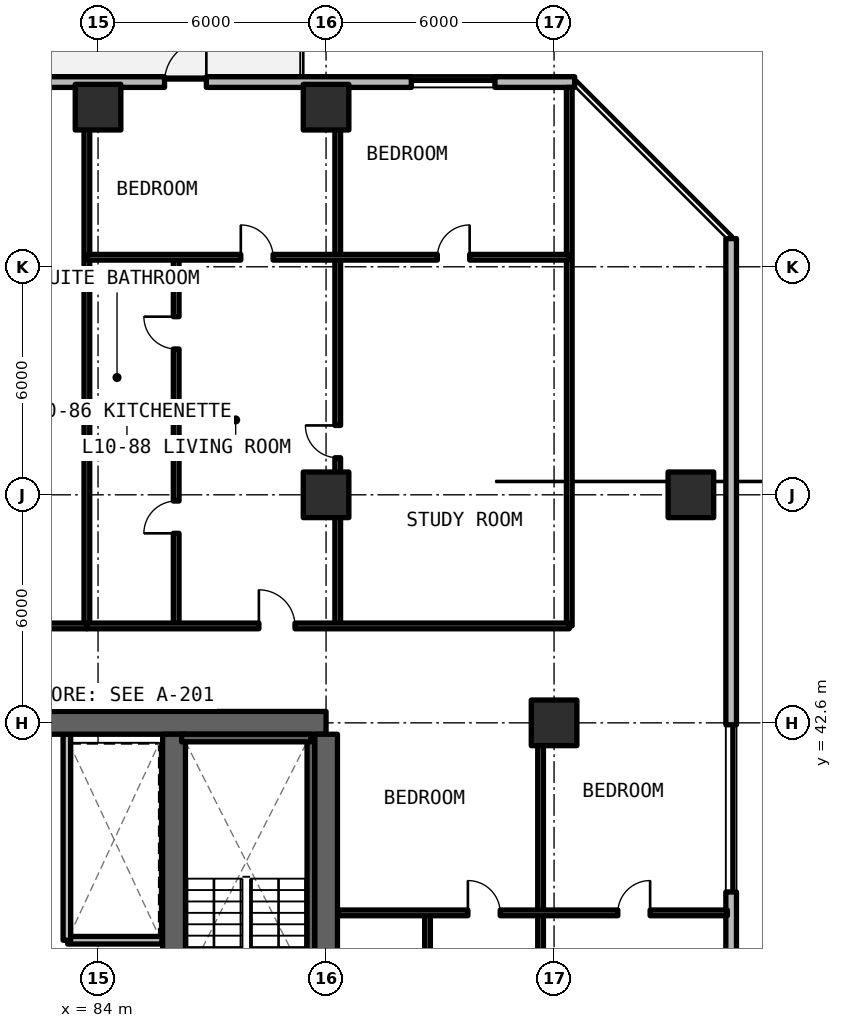
"""IFC4 building model, lengths in metres.
Left out: names, types, materials, properties, quantities, classifications, styles, units other than length and angle.
Written with IfcOpenShell. Run it as: python <this file> out.ifc"""

import sys

from ifc_helpers import new_model, si_unit, direction, frame, frame_2d, origin, origin_2d, place, context, subcontext, project, spatial, rectangle, extrude, element, fill, save


model = new_model("IFC4")
c1 = context("Model", 3, precision=1e-05, world=origin(), true_north=direction((0.0, 1.0)))
c2 = subcontext(c1, "Body", "Model", "MODEL_VIEW")
j1 = project(units=[si_unit("LENGTHUNIT", "METRE"), si_unit("PLANEANGLEUNIT", "RADIAN")], contexts=[c1])
p1 = place(None, origin())
s1 = spatial("IfcSite", under=j1, at=p1, CompositionType="ELEMENT")
p2 = place(p1, origin())
s2 = spatial("IfcBuilding", under=s1, at=p2, CompositionType="ELEMENT")
p3 = place(p2, frame((0.0, 0.0, 38.94)))
s3 = spatial("IfcBuildingStorey", under=s2, at=p3, CompositionType="ELEMENT", Elevation=38.94)
p4 = place(p3, frame((90.0, 42.6, 0.0), z_axis=(0.0, 0.0, 1.0), x_axis=(-1.0, 0.0, 0.0)))
e1 = element("IfcWall", 1, at=p4, inside=s3, PredefinedType="SHEAR", context=c2, shape_type="SweptSolid", body=[
    extrude(rectangle(XDim=12.0, YDim=0.6, at=frame_2d((6.0, 0.0))), origin(), (0.0, 0.0, 1.0), 3.3),
])
p5 = place(p3, frame((90.0, 24.9, 0.0), z_axis=(0.0, 0.0, 1.0), x_axis=(0.0, 1.0, 0.0)))
e2 = element("IfcWall", 2, at=p5, inside=s3, PredefinedType="SHEAR", context=c2, shape_type="SweptSolid", body=[
    extrude(rectangle(XDim=17.4, YDim=0.6, at=frame_2d((8.7, 0.0))), origin(), (0.0, 0.0, 1.0), 3.3),
])
p6 = place(p3, frame((86.0, 24.9, 0.0), z_axis=(0.0, 0.0, 1.0), x_axis=(0.0, 1.0, 0.0)))
e3 = element("IfcWall", 3, at=p6, inside=s3, PredefinedType="SHEAR", context=c2, shape_type="SweptSolid", body=[
    extrude(rectangle(XDim=17.4, YDim=0.6, at=frame_2d((8.7, 0.0))), origin(), (0.0, 0.0, 1.0), 3.3),
])
p7 = place(p6, frame((0.35, 0.0, 0.0)))
e4 = element("IfcOpeningElement", 4, at=p7, cuts=e3, PredefinedType="OPENING", context=c2, shape_type="SweptSolid", body=[
    extrude(rectangle(XDim=1.15, YDim=2.15, at=frame_2d((0.575, 1.075))), frame((0.0, 0.31, 0.0), z_axis=(0.0, -1.0, 0.0), x_axis=(1.0, 0.0, 0.0)), (0.0, 0.0, 1.0), 0.62),
])
p8 = place(p6, frame((9.55, 0.0, 0.0)))
e5 = element("IfcOpeningElement", 5, at=p8, cuts=e3, PredefinedType="OPENING", context=c2, shape_type="SweptSolid", body=[
    extrude(rectangle(XDim=1.15, YDim=2.15, at=frame_2d((0.575, 1.075))), frame((0.0, 0.31, 0.0), z_axis=(0.0, -1.0, 0.0), x_axis=(1.0, 0.0, 0.0)), (0.0, 0.0, 1.0), 0.62),
])
for number, where, z_axis, x_axis in (
    (6, (96.0, 42.6, 0.0), (0.0, 0.0, 1.0), (1.0, 0.0, 0.0)),
    (7, (90.0, 48.6, 0.0), (0.0, 0.0, 1.0), (1.0, 0.0, 0.0)),
    (8, (99.6, 48.6, 0.0), (0.0, 0.0, 1.0), (1.0, 0.0, 0.0)),
    (9, (84.0, 58.8, 0.0), (0.0, 0.0, 1.0), (1.0, 0.0, 0.0)),
    (10, (90.0, 58.8, 0.0), (0.0, 0.0, 1.0), (1.0, 0.0, 0.0)),
):
    element("IfcColumn", number, at=place(p3, frame(where, z_axis=z_axis, x_axis=x_axis)), inside=s3, PredefinedType="COLUMN", context=c2, shape_type="SweptSolid", body=[
        extrude(rectangle(XDim=1.2, YDim=1.2, at=origin_2d()), origin(), (0.0, 0.0, 1.0), 3.3),
    ])
p9 = place(p3, frame((100.66, 11.858, 0.0), z_axis=(0.0, 0.0, 1.0), x_axis=(0.0, 1.0, 0.0)))
e11 = element("IfcWall", 11, at=p9, inside=s3, PredefinedType="SOLIDWALL", context=c2, shape_type="SweptSolid", body=[
    extrude(rectangle(XDim=43.484, YDim=0.28, at=frame_2d((21.742, 0.0))), origin(), (0.0, 0.0, 1.0), 3.08),
])
p10 = place(p9, frame((3.442, 0.0, 0.0)))
e12 = element("IfcOpeningElement", 12, at=p10, cuts=e11, PredefinedType="OPENING", context=c2, shape_type="SweptSolid", body=[
    extrude(rectangle(XDim=1.1, YDim=2.15, at=frame_2d((0.55, 1.075))), frame((0.0, 0.15, 0.0), z_axis=(0.0, -1.0, 0.0), x_axis=(1.0, 0.0, 0.0)), (0.0, 0.0, 1.0), 0.3),
])
p11 = place(p9, frame((16.952, 0.0, 0.78)))
e13 = element("IfcOpeningElement", 13, at=p11, cuts=e11, PredefinedType="OPENING", context=c2, shape_type="SweptSolid", body=[
    extrude(rectangle(XDim=4.4, YDim=1.66, at=frame_2d((2.2, 0.83))), frame((0.0, 0.15, 0.0), z_axis=(0.0, -1.0, 0.0), x_axis=(1.0, 0.0, 0.0)), (0.0, 0.0, 1.0), 0.3),
])
p12 = place(p9, frame((26.292, 0.0, 0.78)))
e14 = element("IfcOpeningElement", 14, at=p12, cuts=e11, PredefinedType="OPENING", context=c2, shape_type="SweptSolid", body=[
    extrude(rectangle(XDim=4.4, YDim=1.66, at=frame_2d((2.2, 0.83))), frame((0.0, 0.15, 0.0), z_axis=(0.0, -1.0, 0.0), x_axis=(1.0, 0.0, 0.0)), (0.0, 0.0, 1.0), 0.3),
])
p13 = place(p3, frame((96.542, 59.46, 0.0), z_axis=(0.0, 0.0, 1.0), x_axis=(-1.0, 0.0, 0.0)))
e15 = element("IfcWall", 15, at=p13, inside=s3, PredefinedType="SOLIDWALL", context=c2, shape_type="SweptSolid", body=[
    extrude(rectangle(XDim=44.402, YDim=0.28, at=frame_2d((22.201, 0.0))), origin(), (0.0, 0.0, 1.0), 3.08),
])
p14 = place(p13, frame((33.642, 0.0, 0.0)))
e16 = element("IfcOpeningElement", 16, at=p14, cuts=e15, PredefinedType="OPENING", context=c2, shape_type="SweptSolid", body=[
    extrude(rectangle(XDim=1.1, YDim=2.15, at=frame_2d((0.55, 1.075))), frame((0.0, 0.15, 0.0), z_axis=(0.0, -1.0, 0.0), x_axis=(1.0, 0.0, 0.0)), (0.0, 0.0, 1.0), 0.3),
])
p15 = place(p13, frame((21.292, 0.0, 0.0)))
e17 = element("IfcOpeningElement", 17, at=p15, cuts=e15, PredefinedType="OPENING", context=c2, shape_type="SweptSolid", body=[
    extrude(rectangle(XDim=1.1, YDim=2.15, at=frame_2d((0.55, 1.075))), frame((0.0, 0.15, 0.0), z_axis=(0.0, -1.0, 0.0), x_axis=(1.0, 0.0, 0.0)), (0.0, 0.0, 1.0), 0.3),
])
p16 = place(p13, frame((9.692, 0.0, 0.0)))
e18 = element("IfcOpeningElement", 18, at=p16, cuts=e15, PredefinedType="OPENING", context=c2, shape_type="SweptSolid", body=[
    extrude(rectangle(XDim=1.1, YDim=2.15, at=frame_2d((0.55, 1.075))), frame((0.0, 0.15, 0.0), z_axis=(0.0, -1.0, 0.0), x_axis=(1.0, 0.0, 0.0)), (0.0, 0.0, 1.0), 0.3),
])
p17 = place(p13, frame((39.455, 0.0, 0.78)))
e19 = element("IfcOpeningElement", 19, at=p17, cuts=e15, PredefinedType="OPENING", context=c2, shape_type="SweptSolid", body=[
    extrude(rectangle(XDim=2.2, YDim=1.66, at=frame_2d((1.1, 0.83))), frame((0.0, 0.15, 0.0), z_axis=(0.0, -1.0, 0.0), x_axis=(1.0, 0.0, 0.0)), (0.0, 0.0, 1.0), 0.3),
])
p18 = place(p13, frame((26.053, 0.0, 0.78)))
e20 = element("IfcOpeningElement", 20, at=p18, cuts=e15, PredefinedType="OPENING", context=c2, shape_type="SweptSolid", body=[
    extrude(rectangle(XDim=2.2, YDim=1.66, at=frame_2d((1.1, 0.83))), frame((0.0, 0.15, 0.0), z_axis=(0.0, -1.0, 0.0), x_axis=(1.0, 0.0, 0.0)), (0.0, 0.0, 1.0), 0.3),
])
p19 = place(p13, frame((2.098, 0.0, 0.78)))
e21 = element("IfcOpeningElement", 21, at=p19, cuts=e15, PredefinedType="OPENING", context=c2, shape_type="SweptSolid", body=[
    extrude(rectangle(XDim=2.2, YDim=1.66, at=frame_2d((1.1, 0.83))), frame((0.0, 0.15, 0.0), z_axis=(0.0, -1.0, 0.0), x_axis=(1.0, 0.0, 0.0)), (0.0, 0.0, 1.0), 0.3),
])
p20 = place(p3, frame((83.2, 36.88, 0.0), z_axis=(0.0, 0.0, 1.0), x_axis=(1.0, 0.0, 0.0)))
e22 = element("IfcWall", 22, at=p20, inside=s3, PredefinedType="SOLIDWALL", context=c2, shape_type="SweptSolid", body=[
    extrude(rectangle(XDim=2.48, YDim=0.2, at=frame_2d((1.24, 0.0))), origin(), (0.0, 0.0, 1.0), 2.35),
])
p21 = place(p3, frame((83.18, 36.88, 0.0), z_axis=(0.0, 0.0, 1.0), x_axis=(0.0, 1.0, 0.0)))
e23 = element("IfcWall", 23, at=p21, inside=s3, PredefinedType="SOLIDWALL", context=c2, shape_type="SweptSolid", body=[
    extrude(rectangle(XDim=5.42, YDim=0.2, at=frame_2d((2.71, 0.0))), origin(), (0.0, 0.0, 1.0), 2.35),
])
p22 = place(p3, frame((95.645, 24.4, 0.0), z_axis=(0.0, 0.0, 1.0), x_axis=(0.0, 1.0, 0.0)))
e24 = element("IfcWall", 24, at=p22, inside=s3, PredefinedType="PARTITIONING", context=c2, shape_type="SweptSolid", body=[
    extrude(rectangle(XDim=13.2, YDim=0.15, at=frame_2d((6.6, 0.0))), origin(), (0.0, 0.0, 1.0), 2.35),
])
p23 = place(p22, frame((6.175, 0.0, 0.0)))
e25 = element("IfcOpeningElement", 25, at=p23, cuts=e24, PredefinedType="OPENING", context=c2, shape_type="SweptSolid", body=[
    extrude(rectangle(XDim=0.85, YDim=2.1, at=frame_2d((0.425, 1.05))), frame((0.0, 0.085, 0.0), z_axis=(0.0, -1.0, 0.0), x_axis=(1.0, 0.0, 0.0)), (0.0, 0.0, 1.0), 0.17),
])
p24 = place(p3, frame((92.67, 24.4, 0.0), z_axis=(0.0, 0.0, 1.0), x_axis=(0.0, 1.0, 0.0)))
e26 = element("IfcWall", 26, at=p24, inside=s3, PredefinedType="PARTITIONING", context=c2, shape_type="SweptSolid", body=[
    extrude(rectangle(XDim=13.2, YDim=0.15, at=frame_2d((6.6, 0.0))), origin(), (0.0, 0.0, 1.0), 2.35),
])
p25 = place(p24, frame((3.469, 0.0, 0.0)))
e27 = element("IfcOpeningElement", 27, at=p25, cuts=e26, PredefinedType="OPENING", context=c2, shape_type="SweptSolid", body=[
    extrude(rectangle(XDim=0.85, YDim=2.1, at=frame_2d((0.425, 1.05))), frame((0.0, 0.085, 0.0), z_axis=(0.0, -1.0, 0.0), x_axis=(1.0, 0.0, 0.0)), (0.0, 0.0, 1.0), 0.17),
])
p26 = place(p24, frame((10.069, 0.0, 0.0)))
e28 = element("IfcOpeningElement", 28, at=p26, cuts=e26, PredefinedType="OPENING", context=c2, shape_type="SweptSolid", body=[
    extrude(rectangle(XDim=0.85, YDim=2.1, at=frame_2d((0.425, 1.05))), frame((0.0, 0.085, 0.0), z_axis=(0.0, -1.0, 0.0), x_axis=(1.0, 0.0, 0.0)), (0.0, 0.0, 1.0), 0.17),
])
p27 = place(p3, frame((95.645, 37.6, 0.0), z_axis=(0.0, 0.0, 1.0), x_axis=(0.0, 1.0, 0.0)))
e29 = element("IfcWall", 29, at=p27, inside=s3, PredefinedType="PARTITIONING", context=c2, shape_type="SweptSolid", body=[
    extrude(rectangle(XDim=5.2, YDim=0.15, at=frame_2d((2.6, 0.0))), origin(), (0.0, 0.0, 1.0), 2.35),
])
p28 = place(p3, frame((90.32, 37.6, 0.0), z_axis=(0.0, 0.0, 1.0), x_axis=(1.0, 0.0, 0.0)))
e30 = element("IfcWall", 30, at=p28, inside=s3, PredefinedType="PARTITIONING", context=c2, shape_type="SweptSolid", body=[
    extrude(rectangle(XDim=10.24, YDim=0.15, at=frame_2d((5.12, 0.0))), origin(), (0.0, 0.0, 1.0), 2.35),
])
p29 = place(p28, frame((3.412, 0.0, 0.0)))
e31 = element("IfcOpeningElement", 31, at=p29, cuts=e30, PredefinedType="OPENING", context=c2, shape_type="SweptSolid", body=[
    extrude(rectangle(XDim=0.85, YDim=2.1, at=frame_2d((0.425, 1.05))), frame((0.0, 0.085, 0.0), z_axis=(0.0, -1.0, 0.0), x_axis=(1.0, 0.0, 0.0)), (0.0, 0.0, 1.0), 0.17),
])
p30 = place(p28, frame((7.357, 0.0, 0.0)))
e32 = element("IfcOpeningElement", 32, at=p30, cuts=e30, PredefinedType="OPENING", context=c2, shape_type="SweptSolid", body=[
    extrude(rectangle(XDim=0.85, YDim=2.1, at=frame_2d((0.425, 1.05))), frame((0.0, 0.085, 0.0), z_axis=(0.0, -1.0, 0.0), x_axis=(1.0, 0.0, 0.0)), (0.0, 0.0, 1.0), 0.17),
])
for number, where, z_axis, x_axis in (
    (33, (96.4, 45.15, 0.0), (0.0, 0.0, 1.0), (0.0, 1.0, 0.0)),
    (34, (83.706, 45.15, 0.0), (0.0, 0.0, 1.0), (0.0, 1.0, 0.0)),
):
    element("IfcWall", number, at=place(p3, frame(where, z_axis=z_axis, x_axis=x_axis)), inside=s3, PredefinedType="SOLIDWALL", context=c2, shape_type="SweptSolid", body=[
        extrude(rectangle(XDim=14.17, YDim=0.15, at=frame_2d((7.085, 0.0))), origin(), (0.0, 0.0, 1.0), 2.35),
    ])
p31 = place(p3, frame((73.67, 45.15, 0.0), z_axis=(0.0, 0.0, 1.0), x_axis=(1.0, 0.0, 0.0)))
e35 = element("IfcWall", 35, at=p31, inside=s3, PredefinedType="SOLIDWALL", context=c2, shape_type="SweptSolid", body=[
    extrude(rectangle(XDim=10.037, YDim=0.15, at=frame_2d((5.018, 0.0))), origin(), (0.0, 0.0, 1.0), 2.35),
])
p32 = place(p31, frame((4.469, 0.0, 0.0)))
e36 = element("IfcOpeningElement", 36, at=p32, cuts=e35, PredefinedType="OPENING", context=c2, shape_type="SweptSolid", body=[
    extrude(rectangle(XDim=1.1, YDim=2.15, at=frame_2d((0.55, 1.075))), frame((0.0, 0.085, 0.0), z_axis=(0.0, -1.0, 0.0), x_axis=(1.0, 0.0, 0.0)), (0.0, 0.0, 1.0), 0.17),
])
p33 = place(p3, frame((90.307, 45.15, 0.0), z_axis=(0.0, 0.0, 1.0), x_axis=(0.0, 1.0, 0.0)))
e37 = element("IfcWall", 37, at=p33, inside=s3, PredefinedType="PARTITIONING", context=c2, shape_type="SweptSolid", body=[
    extrude(rectangle(XDim=9.701, YDim=0.15, at=frame_2d((4.851, 0.0))), origin(), (0.0, 0.0, 1.0), 2.35),
])
p34 = place(p33, frame((4.425, 0.0, 0.0)))
e38 = element("IfcOpeningElement", 38, at=p34, cuts=e37, PredefinedType="OPENING", context=c2, shape_type="SweptSolid", body=[
    extrude(rectangle(XDim=0.85, YDim=2.1, at=frame_2d((0.425, 1.05))), frame((0.0, 0.085, 0.0), z_axis=(0.0, -1.0, 0.0), x_axis=(1.0, 0.0, 0.0)), (0.0, 0.0, 1.0), 0.17),
])
p35 = place(p3, frame((83.706, 50.874, 0.0), z_axis=(0.0, 0.0, 1.0), x_axis=(1.0, 0.0, 0.0)))
e39 = element("IfcWall", 39, at=p35, inside=s3, PredefinedType="PARTITIONING", context=c2, shape_type="SweptSolid", body=[
    extrude(rectangle(XDim=2.35, YDim=0.15, at=frame_2d((1.175, 0.0))), origin(), (0.0, 0.0, 1.0), 2.35),
])
p36 = place(p3, frame((86.056, 45.15, 0.0), z_axis=(0.0, 0.0, 1.0), x_axis=(0.0, 1.0, 0.0)))
e40 = element("IfcWall", 40, at=p36, inside=s3, PredefinedType="PARTITIONING", context=c2, shape_type="SweptSolid", body=[
    extrude(rectangle(XDim=9.701, YDim=0.15, at=frame_2d((4.851, 0.0))), origin(), (0.0, 0.0, 1.0), 2.35),
])
p37 = place(p36, frame((2.437, 0.0, 0.0)))
e41 = element("IfcOpeningElement", 41, at=p37, cuts=e40, PredefinedType="OPENING", context=c2, shape_type="SweptSolid", body=[
    extrude(rectangle(XDim=0.85, YDim=2.1, at=frame_2d((0.425, 1.05))), frame((0.0, 0.085, 0.0), z_axis=(0.0, -1.0, 0.0), x_axis=(1.0, 0.0, 0.0)), (0.0, 0.0, 1.0), 0.17),
])
p38 = place(p36, frame((7.287, 0.0, 0.0)))
e42 = element("IfcOpeningElement", 42, at=p38, cuts=e40, PredefinedType="OPENING", context=c2, shape_type="SweptSolid", body=[
    extrude(rectangle(XDim=0.85, YDim=2.1, at=frame_2d((0.425, 1.05))), frame((0.0, 0.085, 0.0), z_axis=(0.0, -1.0, 0.0), x_axis=(1.0, 0.0, 0.0)), (0.0, 0.0, 1.0), 0.17),
])
p39 = place(p3, frame((90.307, 54.851, 0.0), z_axis=(0.0, 0.0, 1.0), x_axis=(0.0, 1.0, 0.0)))
e43 = element("IfcWall", 43, at=p39, inside=s3, PredefinedType="PARTITIONING", context=c2, shape_type="SweptSolid", body=[
    extrude(rectangle(XDim=4.469, YDim=0.15, at=frame_2d((2.235, 0.0))), origin(), (0.0, 0.0, 1.0), 2.35),
])
p40 = place(p3, frame((83.706, 54.851, 0.0), z_axis=(0.0, 0.0, 1.0), x_axis=(1.0, 0.0, 0.0)))
e44 = element("IfcWall", 44, at=p40, inside=s3, PredefinedType="PARTITIONING", context=c2, shape_type="SweptSolid", body=[
    extrude(rectangle(XDim=12.694, YDim=0.15, at=frame_2d((6.347, 0.0))), origin(), (0.0, 0.0, 1.0), 2.35),
])
p41 = place(p40, frame((4.05, 0.0, 0.0)))
e45 = element("IfcOpeningElement", 45, at=p41, cuts=e44, PredefinedType="OPENING", context=c2, shape_type="SweptSolid", body=[
    extrude(rectangle(XDim=0.85, YDim=2.1, at=frame_2d((0.425, 1.05))), frame((0.0, 0.085, 0.0), z_axis=(0.0, -1.0, 0.0), x_axis=(1.0, 0.0, 0.0)), (0.0, 0.0, 1.0), 0.17),
])
p42 = place(p40, frame((9.222, 0.0, 0.0)))
e46 = element("IfcOpeningElement", 46, at=p42, cuts=e44, PredefinedType="OPENING", context=c2, shape_type="SweptSolid", body=[
    extrude(rectangle(XDim=0.85, YDim=2.1, at=frame_2d((0.425, 1.05))), frame((0.0, 0.085, 0.0), z_axis=(0.0, -1.0, 0.0), x_axis=(1.0, 0.0, 0.0)), (0.0, 0.0, 1.0), 0.17),
])
p43 = place(p3, frame((83.706, 45.15, 0.0), z_axis=(0.0, 0.0, 1.0), x_axis=(1.0, 0.0, 0.0)))
e47 = element("IfcWall", 47, at=p43, inside=s3, PredefinedType="SOLIDWALL", context=c2, shape_type="SweptSolid", body=[
    extrude(rectangle(XDim=12.694, YDim=0.15, at=frame_2d((6.347, 0.0))), origin(), (0.0, 0.0, 1.0), 2.35),
])
p44 = place(p43, frame((4.526, 0.0, 0.0)))
e48 = element("IfcOpeningElement", 48, at=p44, cuts=e47, PredefinedType="OPENING", context=c2, shape_type="SweptSolid", body=[
    extrude(rectangle(XDim=0.95, YDim=2.15, at=frame_2d((0.475, 1.075))), frame((0.0, 0.085, 0.0), z_axis=(0.0, -1.0, 0.0), x_axis=(1.0, 0.0, 0.0)), (0.0, 0.0, 1.0), 0.17),
])
p45 = place(p3, frame((89.6, 34.2, 0.0), z_axis=(0.0, 0.0, 1.0), x_axis=(0.0, 1.0, 0.0)))
e49 = element("IfcWall", 49, at=p45, inside=s3, PredefinedType="SOLIDWALL", context=c2, shape_type="SweptSolid", body=[
    extrude(rectangle(XDim=8.0, YDim=0.2, at=frame_2d((4.0, 0.0))), origin(), (0.0, 0.0, 1.0), 3.3),
])
p46 = place(p3, frame((89.6, 42.2, 0.0), z_axis=(0.0, 0.0, 1.0), x_axis=(-1.0, 0.0, 0.0)))
e50 = element("IfcWall", 50, at=p46, inside=s3, PredefinedType="SOLIDWALL", context=c2, shape_type="SweptSolid", body=[
    extrude(rectangle(XDim=3.4, YDim=0.2, at=frame_2d((1.7, 0.0))), origin(), (0.0, 0.0, 1.0), 3.3),
])
p47 = place(p12, origin())
e51 = element("IfcWindow", 51, at=p47, inside=s3, PartitioningType="SINGLE_PANEL", PredefinedType="WINDOW", context=c2, shape_type="SweptSolid", body=[
    extrude(rectangle(XDim=4.4, YDim=1.66, at=frame_2d((2.2, 0.83))), frame((0.0, 0.03, 0.0), z_axis=(0.0, -1.0, 0.0), x_axis=(1.0, 0.0, 0.0)), (0.0, 0.0, 1.0), 0.06),
])
fill(e14, e51)
p48 = place(p16, frame((1.1, 0.0, 0.0), z_axis=(0.0, 0.0, 1.0), x_axis=(-1.0, 0.0, 0.0)))
e52 = element("IfcDoor", 52, at=p48, inside=s3, OperationType="SINGLE_SWING_LEFT", PredefinedType="DOOR", context=c2, shape_type="SweptSolid", body=[
    extrude(rectangle(XDim=1.1, YDim=2.15, at=frame_2d((0.55, 1.075))), frame((0.0, 0.025, 0.0), z_axis=(0.0, -1.0, 0.0), x_axis=(1.0, 0.0, 0.0)), (0.0, 0.0, 1.0), 0.05),
])
fill(e18, e52)
p49 = place(p19, origin())
e53 = element("IfcWindow", 53, at=p49, inside=s3, PartitioningType="SINGLE_PANEL", PredefinedType="WINDOW", context=c2, shape_type="SweptSolid", body=[
    extrude(rectangle(XDim=2.2, YDim=1.66, at=frame_2d((1.1, 0.83))), frame((0.0, 0.03, 0.0), z_axis=(0.0, -1.0, 0.0), x_axis=(1.0, 0.0, 0.0)), (0.0, 0.0, 1.0), 0.06),
])
fill(e21, e53)
p50 = place(p29, origin())
e54 = element("IfcDoor", 54, at=p50, inside=s3, OperationType="SINGLE_SWING_LEFT", PredefinedType="DOOR", context=c2, shape_type="SweptSolid", body=[
    extrude(rectangle(XDim=0.85, YDim=2.1, at=frame_2d((0.425, 1.05))), frame((0.0, 0.025, 0.0), z_axis=(0.0, -1.0, 0.0), x_axis=(1.0, 0.0, 0.0)), (0.0, 0.0, 1.0), 0.05),
])
fill(e31, e54)
p51 = place(p30, origin())
e55 = element("IfcDoor", 55, at=p51, inside=s3, OperationType="SINGLE_SWING_RIGHT", PredefinedType="DOOR", context=c2, shape_type="SweptSolid", body=[
    extrude(rectangle(XDim=0.85, YDim=2.1, at=frame_2d((0.425, 1.05))), frame((0.0, 0.025, 0.0), z_axis=(0.0, -1.0, 0.0), x_axis=(1.0, 0.0, 0.0)), (0.0, 0.0, 1.0), 0.05),
])
fill(e32, e55)
p52 = place(p34, origin())
e56 = element("IfcDoor", 56, at=p52, inside=s3, OperationType="SINGLE_SWING_RIGHT", PredefinedType="DOOR", context=c2, shape_type="SweptSolid", body=[
    extrude(rectangle(XDim=0.85, YDim=2.1, at=frame_2d((0.425, 1.05))), frame((0.0, 0.025, 0.0), z_axis=(0.0, -1.0, 0.0), x_axis=(1.0, 0.0, 0.0)), (0.0, 0.0, 1.0), 0.05),
])
fill(e38, e56)
p53 = place(p37, origin())
e57 = element("IfcDoor", 57, at=p53, inside=s3, OperationType="SINGLE_SWING_LEFT", PredefinedType="DOOR", context=c2, shape_type="SweptSolid", body=[
    extrude(rectangle(XDim=0.85, YDim=2.1, at=frame_2d((0.425, 1.05))), frame((0.0, 0.025, 0.0), z_axis=(0.0, -1.0, 0.0), x_axis=(1.0, 0.0, 0.0)), (0.0, 0.0, 1.0), 0.05),
])
fill(e41, e57)
p54 = place(p38, origin())
e58 = element("IfcDoor", 58, at=p54, inside=s3, OperationType="SINGLE_SWING_RIGHT", PredefinedType="DOOR", context=c2, shape_type="SweptSolid", body=[
    extrude(rectangle(XDim=0.85, YDim=2.1, at=frame_2d((0.425, 1.05))), frame((0.0, 0.025, 0.0), z_axis=(0.0, -1.0, 0.0), x_axis=(1.0, 0.0, 0.0)), (0.0, 0.0, 1.0), 0.05),
])
fill(e42, e58)
p55 = place(p41, origin())
e59 = element("IfcDoor", 59, at=p55, inside=s3, OperationType="SINGLE_SWING_LEFT", PredefinedType="DOOR", context=c2, shape_type="SweptSolid", body=[
    extrude(rectangle(XDim=0.85, YDim=2.1, at=frame_2d((0.425, 1.05))), frame((0.0, 0.025, 0.0), z_axis=(0.0, -1.0, 0.0), x_axis=(1.0, 0.0, 0.0)), (0.0, 0.0, 1.0), 0.05),
])
fill(e45, e59)
p56 = place(p42, origin())
e60 = element("IfcDoor", 60, at=p56, inside=s3, OperationType="SINGLE_SWING_RIGHT", PredefinedType="DOOR", context=c2, shape_type="SweptSolid", body=[
    extrude(rectangle(XDim=0.85, YDim=2.1, at=frame_2d((0.425, 1.05))), frame((0.0, 0.025, 0.0), z_axis=(0.0, -1.0, 0.0), x_axis=(1.0, 0.0, 0.0)), (0.0, 0.0, 1.0), 0.05),
])
fill(e46, e60)
p57 = place(p44, origin())
e61 = element("IfcDoor", 61, at=p57, inside=s3, OperationType="SINGLE_SWING_LEFT", PredefinedType="DOOR", context=c2, shape_type="SweptSolid", body=[
    extrude(rectangle(XDim=0.95, YDim=2.15, at=frame_2d((0.475, 1.075))), frame((0.0, 0.025, 0.0), z_axis=(0.0, -1.0, 0.0), x_axis=(1.0, 0.0, 0.0)), (0.0, 0.0, 1.0), 0.05),
])
fill(e48, e61)
save(model, sys.argv[1])
